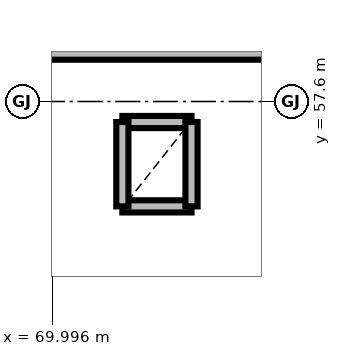
"""IFC4 building model, lengths in metres.
Left out: names, types, materials, properties, quantities, classifications, styles, units other than length and angle.
Written with IfcOpenShell. Run it as: python <this file> out.ifc"""

import sys

from ifc_helpers import new_model, si_unit, direction, frame, frame_2d, origin, place, context, subcontext, project, spatial, rectangle, extrude, element, save


model = new_model("IFC4")
c1 = context("Model", 3, precision=1e-05, world=origin(), true_north=direction((0.0, 1.0)))
c2 = subcontext(c1, "Body", "Model", "MODEL_VIEW")
j1 = project(units=[si_unit("LENGTHUNIT", "METRE"), si_unit("PLANEANGLEUNIT", "RADIAN")], contexts=[c1])
p1 = place(None, origin())
s1 = spatial("IfcSite", under=j1, at=p1, CompositionType="ELEMENT")
p2 = place(p1, origin())
s2 = spatial("IfcBuilding", under=s1, at=p2, CompositionType="ELEMENT")
p3 = place(p2, frame((0.0, 0.0, 5.1)))
s3 = spatial("IfcBuildingStorey", under=s2, at=p3, CompositionType="ELEMENT", Elevation=5.1)
p4 = place(p3, frame((70.92, 56.22, 0.0), z_axis=(0.0, 0.0, 1.0), x_axis=(1.0, 0.0, 0.0)))
e1 = element("IfcWall", 1, at=p4, inside=s3, PredefinedType="PARTITIONING", context=c2, shape_type="SweptSolid", body=[
    extrude(rectangle(XDim=0.91, YDim=0.16, at=frame_2d((0.455, 0.0))), origin(), (0.0, 0.0, 1.0), 3.65),
])
p5 = place(p3, frame((71.83, 57.33, 0.0), z_axis=(0.0, 0.0, 1.0), x_axis=(-1.0, 0.0, 0.0)))
e2 = element("IfcWall", 2, at=p5, inside=s3, PredefinedType="PARTITIONING", context=c2, shape_type="SweptSolid", body=[
    extrude(rectangle(XDim=0.91, YDim=0.16, at=frame_2d((0.455, 0.0))), origin(), (0.0, 0.0, 1.0), 3.155),
])
for number, where, z_axis, x_axis in (
    (3, (70.92, 57.33, 0.0), (0.0, 0.0, 1.0), (0.0, -1.0, 0.0)),
    (4, (71.83, 56.22, 0.0), (0.0, 0.0, 1.0), (0.0, 1.0, 0.0)),
):
    element("IfcWall", number, at=place(p3, frame(where, z_axis=z_axis, x_axis=x_axis)), inside=s3, PredefinedType="PARTITIONING", context=c2, shape_type="SweptSolid", body=[
        extrude(rectangle(XDim=1.11, YDim=0.16, at=frame_2d((0.555, 0.0))), origin(), (0.0, 0.0, 1.0), 3.155),
    ])
p6 = place(p3, frame((92.4, 58.25, 0.0), z_axis=(0.0, 0.0, 1.0), x_axis=(-1.0, 0.0, 0.0)))
e5 = element("IfcWall", 5, at=p6, inside=s3, PredefinedType="SOLIDWALL", context=c2, shape_type="SweptSolid", body=[
    extrude(rectangle(XDim=42.0, YDim=0.2, at=frame_2d((21.0, 0.0))), origin(), (0.0, 0.0, 1.0), 3.305),
])
p7 = place(p6, frame((26.725, 0.0, 0.0)))
e6 = element("IfcOpeningElement", 6, at=p7, cuts=e5, PredefinedType="OPENING", context=c2, shape_type="SweptSolid", body=[
    extrude(rectangle(XDim=1.15, YDim=2.15, at=frame_2d((0.575, 1.075))), frame((0.0, 0.11, 0.0), z_axis=(0.0, -1.0, 0.0), x_axis=(1.0, 0.0, 0.0)), (0.0, 0.0, 1.0), 0.22),
])
save(model, sys.argv[1])
